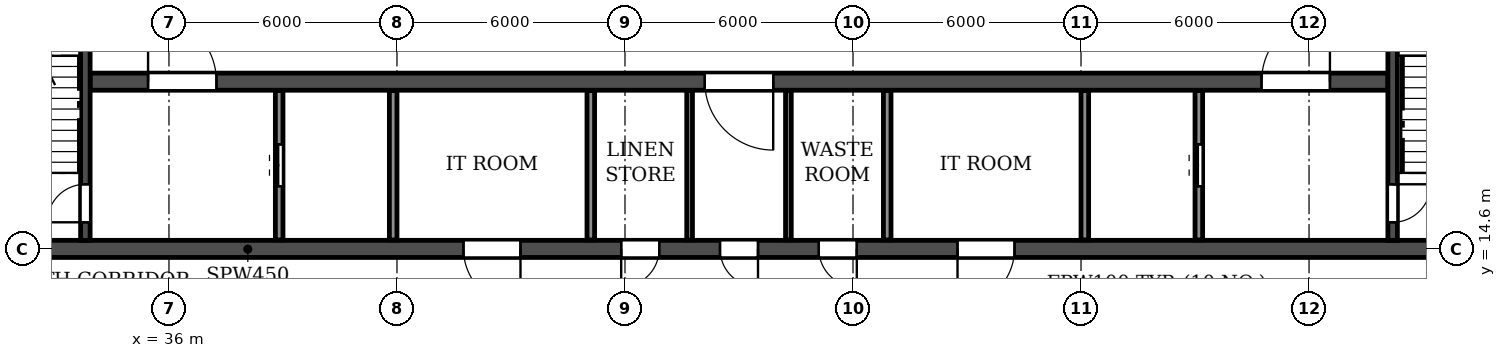
"""IFC4 building model, lengths in metres.
Left out: names, types, materials, properties, quantities, classifications, styles, units other than length and angle.
Written with IfcOpenShell. Run it as: python <this file> out.ifc"""

import sys

from ifc_helpers import new_model, si_unit, direction, frame, frame_2d, origin, place, context, subcontext, project, spatial, rectangle, extrude, element, fill, save


model = new_model("IFC4")
c1 = context("Model", 3, precision=1e-05, world=origin(), true_north=direction((0.0, 1.0)))
c2 = subcontext(c1, "Body", "Model", "MODEL_VIEW")
j1 = project(units=[si_unit("LENGTHUNIT", "METRE"), si_unit("PLANEANGLEUNIT", "RADIAN")], contexts=[c1])
p1 = place(None, origin())
s1 = spatial("IfcSite", under=j1, at=p1, CompositionType="ELEMENT")
p2 = place(p1, origin())
s2 = spatial("IfcBuilding", under=s1, at=p2, CompositionType="ELEMENT")
p3 = place(p2, frame((0.0, 0.0, 132.3)))
s3 = spatial("IfcBuildingStorey", under=s2, at=p3, CompositionType="ELEMENT", Elevation=132.3)
p4 = place(p3, frame((12.2, 14.6, 0.0), z_axis=(0.0, 0.0, 1.0), x_axis=(1.0, 0.0, 0.0)))
e1 = element("IfcWall", 1, at=p4, inside=s3, PredefinedType="SOLIDWALL", context=c2, shape_type="SweptSolid", body=[
    extrude(rectangle(XDim=77.6, YDim=0.45, at=frame_2d((38.8, 0.0))), origin(), (0.0, 0.0, 1.0), 3.07),
])
p5 = place(p4, frame((2.3, 0.0, 0.0)))
e2 = element("IfcOpeningElement", 2, at=p5, cuts=e1, PredefinedType="OPENING", context=c2, shape_type="SweptSolid", body=[
    extrude(rectangle(XDim=1.0, YDim=2.1, at=frame_2d((0.5, 1.05))), frame((0.0, 0.235, 0.0), z_axis=(0.0, -1.0, 0.0), x_axis=(1.0, 0.0, 0.0)), (0.0, 0.0, 1.0), 0.47),
])
p6 = place(p4, frame((6.7, 0.0, 0.0)))
e3 = element("IfcOpeningElement", 3, at=p6, cuts=e1, PredefinedType="OPENING", context=c2, shape_type="SweptSolid", body=[
    extrude(rectangle(XDim=1.0, YDim=2.1, at=frame_2d((0.5, 1.05))), frame((0.0, 0.235, 0.0), z_axis=(0.0, -1.0, 0.0), x_axis=(1.0, 0.0, 0.0)), (0.0, 0.0, 1.0), 0.47),
])
p7 = place(p4, frame((14.6, 0.0, 0.0)))
e4 = element("IfcOpeningElement", 4, at=p7, cuts=e1, PredefinedType="OPENING", context=c2, shape_type="SweptSolid", body=[
    extrude(rectangle(XDim=1.0, YDim=2.1, at=frame_2d((0.5, 1.05))), frame((0.0, 0.235, 0.0), z_axis=(0.0, -1.0, 0.0), x_axis=(1.0, 0.0, 0.0)), (0.0, 0.0, 1.0), 0.47),
])
p8 = place(p4, frame((19.2, 0.0, 0.0)))
e5 = element("IfcOpeningElement", 5, at=p8, cuts=e1, PredefinedType="OPENING", context=c2, shape_type="SweptSolid", body=[
    extrude(rectangle(XDim=1.0, YDim=2.1, at=frame_2d((0.5, 1.05))), frame((0.0, 0.235, 0.0), z_axis=(0.0, -1.0, 0.0), x_axis=(1.0, 0.0, 0.0)), (0.0, 0.0, 1.0), 0.47),
])
p9 = place(p4, frame((31.55, 0.0, 0.0)))
e6 = element("IfcOpeningElement", 6, at=p9, cuts=e1, PredefinedType="OPENING", context=c2, shape_type="SweptSolid", body=[
    extrude(rectangle(XDim=1.5, YDim=2.1, at=frame_2d((0.75, 1.05))), frame((0.0, 0.235, 0.0), z_axis=(0.0, -1.0, 0.0), x_axis=(1.0, 0.0, 0.0)), (0.0, 0.0, 1.0), 0.47),
])
p10 = place(p4, frame((35.7, 0.0, 0.0)))
e7 = element("IfcOpeningElement", 7, at=p10, cuts=e1, PredefinedType="OPENING", context=c2, shape_type="SweptSolid", body=[
    extrude(rectangle(XDim=1.0, YDim=2.1, at=frame_2d((0.5, 1.05))), frame((0.0, 0.235, 0.0), z_axis=(0.0, -1.0, 0.0), x_axis=(1.0, 0.0, 0.0)), (0.0, 0.0, 1.0), 0.47),
])
p11 = place(p4, frame((38.3, 0.0, 0.0)))
e8 = element("IfcOpeningElement", 8, at=p11, cuts=e1, PredefinedType="OPENING", context=c2, shape_type="SweptSolid", body=[
    extrude(rectangle(XDim=1.0, YDim=2.1, at=frame_2d((0.5, 1.05))), frame((0.0, 0.235, 0.0), z_axis=(0.0, -1.0, 0.0), x_axis=(1.0, 0.0, 0.0)), (0.0, 0.0, 1.0), 0.47),
])
p12 = place(p4, frame((40.9, 0.0, 0.0)))
e9 = element("IfcOpeningElement", 9, at=p12, cuts=e1, PredefinedType="OPENING", context=c2, shape_type="SweptSolid", body=[
    extrude(rectangle(XDim=1.0, YDim=2.1, at=frame_2d((0.5, 1.05))), frame((0.0, 0.235, 0.0), z_axis=(0.0, -1.0, 0.0), x_axis=(1.0, 0.0, 0.0)), (0.0, 0.0, 1.0), 0.47),
])
p13 = place(p4, frame((44.55, 0.0, 0.0)))
e10 = element("IfcOpeningElement", 10, at=p13, cuts=e1, PredefinedType="OPENING", context=c2, shape_type="SweptSolid", body=[
    extrude(rectangle(XDim=1.5, YDim=2.1, at=frame_2d((0.75, 1.05))), frame((0.0, 0.235, 0.0), z_axis=(0.0, -1.0, 0.0), x_axis=(1.0, 0.0, 0.0)), (0.0, 0.0, 1.0), 0.47),
])
p14 = place(p4, frame((57.4, 0.0, 0.0)))
e11 = element("IfcOpeningElement", 11, at=p14, cuts=e1, PredefinedType="OPENING", context=c2, shape_type="SweptSolid", body=[
    extrude(rectangle(XDim=1.0, YDim=2.1, at=frame_2d((0.5, 1.05))), frame((0.0, 0.235, 0.0), z_axis=(0.0, -1.0, 0.0), x_axis=(1.0, 0.0, 0.0)), (0.0, 0.0, 1.0), 0.47),
])
p15 = place(p4, frame((62.0, 0.0, 0.0)))
e12 = element("IfcOpeningElement", 12, at=p15, cuts=e1, PredefinedType="OPENING", context=c2, shape_type="SweptSolid", body=[
    extrude(rectangle(XDim=1.0, YDim=2.1, at=frame_2d((0.5, 1.05))), frame((0.0, 0.235, 0.0), z_axis=(0.0, -1.0, 0.0), x_axis=(1.0, 0.0, 0.0)), (0.0, 0.0, 1.0), 0.47),
])
p16 = place(p4, frame((69.9, 0.0, 0.0)))
e13 = element("IfcOpeningElement", 13, at=p16, cuts=e1, PredefinedType="OPENING", context=c2, shape_type="SweptSolid", body=[
    extrude(rectangle(XDim=1.0, YDim=2.1, at=frame_2d((0.5, 1.05))), frame((0.0, 0.235, 0.0), z_axis=(0.0, -1.0, 0.0), x_axis=(1.0, 0.0, 0.0)), (0.0, 0.0, 1.0), 0.47),
])
p17 = place(p4, frame((74.3, 0.0, 0.0)))
e14 = element("IfcOpeningElement", 14, at=p17, cuts=e1, PredefinedType="OPENING", context=c2, shape_type="SweptSolid", body=[
    extrude(rectangle(XDim=1.0, YDim=2.1, at=frame_2d((0.5, 1.05))), frame((0.0, 0.235, 0.0), z_axis=(0.0, -1.0, 0.0), x_axis=(1.0, 0.0, 0.0)), (0.0, 0.0, 1.0), 0.47),
])
p18 = place(p3, frame((33.925, 19.0, 0.0), z_axis=(0.0, 0.0, 1.0), x_axis=(1.0, 0.0, 0.0)))
e15 = element("IfcWall", 15, at=p18, inside=s3, PredefinedType="SOLIDWALL", context=c2, shape_type="SweptSolid", body=[
    extrude(rectangle(XDim=34.15, YDim=0.45, at=frame_2d((17.075, 0.0))), origin(), (0.0, 0.0, 1.0), 3.07),
])
p19 = place(p18, frame((16.175, 0.0, 0.0)))
e16 = element("IfcOpeningElement", 16, at=p19, cuts=e15, PredefinedType="OPENING", context=c2, shape_type="SweptSolid", body=[
    extrude(rectangle(XDim=1.8, YDim=2.1, at=frame_2d((0.9, 1.05))), frame((0.0, 0.235, 0.0), z_axis=(0.0, -1.0, 0.0), x_axis=(1.0, 0.0, 0.0)), (0.0, 0.0, 1.0), 0.47),
])
p20 = place(p18, frame((1.525, 0.0, 0.0)))
e17 = element("IfcOpeningElement", 17, at=p20, cuts=e15, PredefinedType="OPENING", context=c2, shape_type="SweptSolid", body=[
    extrude(rectangle(XDim=1.8, YDim=2.1, at=frame_2d((0.9, 1.05))), frame((0.0, 0.235, 0.0), z_axis=(0.0, -1.0, 0.0), x_axis=(1.0, 0.0, 0.0)), (0.0, 0.0, 1.0), 0.47),
])
p21 = place(p18, frame((30.825, 0.0, 0.0)))
e18 = element("IfcOpeningElement", 18, at=p21, cuts=e15, PredefinedType="OPENING", context=c2, shape_type="SweptSolid", body=[
    extrude(rectangle(XDim=1.8, YDim=2.1, at=frame_2d((0.9, 1.05))), frame((0.0, 0.235, 0.0), z_axis=(0.0, -1.0, 0.0), x_axis=(1.0, 0.0, 0.0)), (0.0, 0.0, 1.0), 0.47),
])
p22 = place(p3, frame((33.8, 14.825, 0.0), z_axis=(0.0, 0.0, 1.0), x_axis=(0.0, 1.0, 0.0)))
e19 = element("IfcWall", 19, at=p22, inside=s3, PredefinedType="SOLIDWALL", context=c2, shape_type="SweptSolid", body=[
    extrude(rectangle(XDim=7.65, YDim=0.25, at=frame_2d((3.825, 0.0))), origin(), (0.0, 0.0, 1.0), 3.07),
])
p23 = place(p22, frame((0.475, 0.0, 0.0)))
e20 = element("IfcOpeningElement", 20, at=p23, cuts=e19, PredefinedType="OPENING", context=c2, shape_type="SweptSolid", body=[
    extrude(rectangle(XDim=1.0, YDim=2.1, at=frame_2d((0.5, 1.05))), frame((0.0, 0.135, 0.0), z_axis=(0.0, -1.0, 0.0), x_axis=(1.0, 0.0, 0.0)), (0.0, 0.0, 1.0), 0.27),
])
p24 = place(p3, frame((68.2, 14.825, 0.0), z_axis=(0.0, 0.0, 1.0), x_axis=(0.0, 1.0, 0.0)))
e21 = element("IfcWall", 21, at=p24, inside=s3, PredefinedType="SOLIDWALL", context=c2, shape_type="SweptSolid", body=[
    extrude(rectangle(XDim=7.65, YDim=0.25, at=frame_2d((3.825, 0.0))), origin(), (0.0, 0.0, 1.0), 3.07),
])
p25 = place(p24, frame((0.475, 0.0, 0.0)))
e22 = element("IfcOpeningElement", 22, at=p25, cuts=e21, PredefinedType="OPENING", context=c2, shape_type="SweptSolid", body=[
    extrude(rectangle(XDim=1.0, YDim=2.1, at=frame_2d((0.5, 1.05))), frame((0.0, 0.135, 0.0), z_axis=(0.0, -1.0, 0.0), x_axis=(1.0, 0.0, 0.0)), (0.0, 0.0, 1.0), 0.27),
])
for number, where, z_axis, x_axis in (
    (23, (49.7, 14.835, 0.0), (0.0, 0.0, 1.0), (0.0, 1.0, 0.0)),
    (24, (52.3, 14.835, 0.0), (0.0, 0.0, 1.0), (0.0, 1.0, 0.0)),
):
    element("IfcWall", number, at=place(p3, frame(where, z_axis=z_axis, x_axis=x_axis)), inside=s3, PredefinedType="PARTITIONING", context=c2, shape_type="SweptSolid", body=[
        extrude(rectangle(XDim=3.93, YDim=0.15, at=frame_2d((1.965, 0.0))), origin(), (0.0, 0.0, 1.0), 3.07),
    ])
for number, where, z_axis, x_axis in (
    (25, (47.1, 14.835, 0.0), (0.0, 0.0, 1.0), (0.0, 1.0, 0.0)),
    (26, (54.9, 14.835, 0.0), (0.0, 0.0, 1.0), (0.0, 1.0, 0.0)),
):
    element("IfcWall", number, at=place(p3, frame(where, z_axis=z_axis, x_axis=x_axis)), inside=s3, PredefinedType="PARTITIONING", context=c2, shape_type="SweptSolid", body=[
        extrude(rectangle(XDim=3.93, YDim=0.2, at=frame_2d((1.965, 0.0))), origin(), (0.0, 0.0, 1.0), 3.07),
    ])
p26 = place(p3, frame((38.9, 14.835, 0.0), z_axis=(0.0, 0.0, 1.0), x_axis=(0.0, 1.0, 0.0)))
e27 = element("IfcWall", 27, at=p26, inside=s3, PredefinedType="PARTITIONING", context=c2, shape_type="SweptSolid", body=[
    extrude(rectangle(XDim=3.93, YDim=0.2, at=frame_2d((1.965, 0.0))), origin(), (0.0, 0.0, 1.0), 3.07),
])
p27 = place(p26, frame((1.415, 0.0, 0.0)))
e28 = element("IfcOpeningElement", 28, at=p27, cuts=e27, PredefinedType="OPENING", context=c2, shape_type="SweptSolid", body=[
    extrude(rectangle(XDim=1.1, YDim=2.1, at=frame_2d((0.55, 1.05))), frame((0.0, 0.11, 0.0), z_axis=(0.0, -1.0, 0.0), x_axis=(1.0, 0.0, 0.0)), (0.0, 0.0, 1.0), 0.22),
])
for number, where, z_axis, x_axis in (
    (29, (41.9, 14.835, 0.0), (0.0, 0.0, 1.0), (0.0, 1.0, 0.0)),
    (30, (60.1, 14.835, 0.0), (0.0, 0.0, 1.0), (0.0, 1.0, 0.0)),
):
    element("IfcWall", number, at=place(p3, frame(where, z_axis=z_axis, x_axis=x_axis)), inside=s3, PredefinedType="PARTITIONING", context=c2, shape_type="SweptSolid", body=[
        extrude(rectangle(XDim=3.93, YDim=0.2, at=frame_2d((1.965, 0.0))), origin(), (0.0, 0.0, 1.0), 3.07),
    ])
p28 = place(p3, frame((63.1, 14.835, 0.0), z_axis=(0.0, 0.0, 1.0), x_axis=(0.0, 1.0, 0.0)))
e31 = element("IfcWall", 31, at=p28, inside=s3, PredefinedType="PARTITIONING", context=c2, shape_type="SweptSolid", body=[
    extrude(rectangle(XDim=3.93, YDim=0.2, at=frame_2d((1.965, 0.0))), origin(), (0.0, 0.0, 1.0), 3.07),
])
p29 = place(p28, frame((1.415, 0.0, 0.0)))
e32 = element("IfcOpeningElement", 32, at=p29, cuts=e31, PredefinedType="OPENING", context=c2, shape_type="SweptSolid", body=[
    extrude(rectangle(XDim=1.1, YDim=2.1, at=frame_2d((0.55, 1.05))), frame((0.0, 0.11, 0.0), z_axis=(0.0, -1.0, 0.0), x_axis=(1.0, 0.0, 0.0)), (0.0, 0.0, 1.0), 0.22),
])
p30 = place(p9, frame((1.5, 0.0, 0.0), z_axis=(0.0, 0.0, 1.0), x_axis=(-1.0, 0.0, 0.0)))
e33 = element("IfcDoor", 33, at=p30, inside=s3, OperationType="DOUBLE_DOOR_SINGLE_SWING", PredefinedType="DOOR", context=c2, shape_type="SweptSolid", body=[
    extrude(rectangle(XDim=1.5, YDim=2.1, at=frame_2d((0.75, 1.05))), frame((0.0, 0.025, 0.0), z_axis=(0.0, -1.0, 0.0), x_axis=(1.0, 0.0, 0.0)), (0.0, 0.0, 1.0), 0.05),
])
fill(e6, e33)
p31 = place(p10, frame((1.0, 0.0, 0.0), z_axis=(0.0, 0.0, 1.0), x_axis=(-1.0, 0.0, 0.0)))
e34 = element("IfcDoor", 34, at=p31, inside=s3, OperationType="SINGLE_SWING_RIGHT", PredefinedType="DOOR", context=c2, shape_type="SweptSolid", body=[
    extrude(rectangle(XDim=1.0, YDim=2.1, at=frame_2d((0.5, 1.05))), frame((0.0, 0.025, 0.0), z_axis=(0.0, -1.0, 0.0), x_axis=(1.0, 0.0, 0.0)), (0.0, 0.0, 1.0), 0.05),
])
fill(e7, e34)
p32 = place(p11, frame((1.0, 0.0, 0.0), z_axis=(0.0, 0.0, 1.0), x_axis=(-1.0, 0.0, 0.0)))
e35 = element("IfcDoor", 35, at=p32, inside=s3, OperationType="SINGLE_SWING_LEFT", PredefinedType="DOOR", context=c2, shape_type="SweptSolid", body=[
    extrude(rectangle(XDim=1.0, YDim=2.1, at=frame_2d((0.5, 1.05))), frame((0.0, 0.025, 0.0), z_axis=(0.0, -1.0, 0.0), x_axis=(1.0, 0.0, 0.0)), (0.0, 0.0, 1.0), 0.05),
])
fill(e8, e35)
p33 = place(p12, frame((1.0, 0.0, 0.0), z_axis=(0.0, 0.0, 1.0), x_axis=(-1.0, 0.0, 0.0)))
e36 = element("IfcDoor", 36, at=p33, inside=s3, OperationType="SINGLE_SWING_LEFT", PredefinedType="DOOR", context=c2, shape_type="SweptSolid", body=[
    extrude(rectangle(XDim=1.0, YDim=2.1, at=frame_2d((0.5, 1.05))), frame((0.0, 0.025, 0.0), z_axis=(0.0, -1.0, 0.0), x_axis=(1.0, 0.0, 0.0)), (0.0, 0.0, 1.0), 0.05),
])
fill(e9, e36)
p34 = place(p13, frame((1.5, 0.0, 0.0), z_axis=(0.0, 0.0, 1.0), x_axis=(-1.0, 0.0, 0.0)))
e37 = element("IfcDoor", 37, at=p34, inside=s3, OperationType="DOUBLE_DOOR_SINGLE_SWING", PredefinedType="DOOR", context=c2, shape_type="SweptSolid", body=[
    extrude(rectangle(XDim=1.5, YDim=2.1, at=frame_2d((0.75, 1.05))), frame((0.0, 0.025, 0.0), z_axis=(0.0, -1.0, 0.0), x_axis=(1.0, 0.0, 0.0)), (0.0, 0.0, 1.0), 0.05),
])
fill(e10, e37)
p35 = place(p29, origin())
e38 = element("IfcDoor", 38, at=p35, inside=s3, OperationType="DOUBLE_DOOR_SLIDING", PredefinedType="DOOR", context=c2, shape_type="SweptSolid", body=[
    extrude(rectangle(XDim=1.1, YDim=2.1, at=frame_2d((0.55, 1.05))), frame((0.0, 0.025, 0.0), z_axis=(0.0, -1.0, 0.0), x_axis=(1.0, 0.0, 0.0)), (0.0, 0.0, 1.0), 0.05),
])
fill(e32, e38)
p36 = place(p25, frame((1.0, 0.0, 0.0), z_axis=(0.0, 0.0, 1.0), x_axis=(-1.0, 0.0, 0.0)))
e39 = element("IfcDoor", 39, at=p36, inside=s3, OperationType="SINGLE_SWING_LEFT", PredefinedType="DOOR", context=c2, shape_type="SweptSolid", body=[
    extrude(rectangle(XDim=1.0, YDim=2.1, at=frame_2d((0.5, 1.05))), frame((0.0, 0.025, 0.0), z_axis=(0.0, -1.0, 0.0), x_axis=(1.0, 0.0, 0.0)), (0.0, 0.0, 1.0), 0.05),
])
fill(e22, e39)
p37 = place(p23, origin())
e40 = element("IfcDoor", 40, at=p37, inside=s3, OperationType="SINGLE_SWING_LEFT", PredefinedType="DOOR", context=c2, shape_type="SweptSolid", body=[
    extrude(rectangle(XDim=1.0, YDim=2.1, at=frame_2d((0.5, 1.05))), frame((0.0, 0.025, 0.0), z_axis=(0.0, -1.0, 0.0), x_axis=(1.0, 0.0, 0.0)), (0.0, 0.0, 1.0), 0.05),
])
fill(e20, e40)
p38 = place(p27, origin())
e41 = element("IfcDoor", 41, at=p38, inside=s3, OperationType="DOUBLE_DOOR_SLIDING", PredefinedType="DOOR", context=c2, shape_type="SweptSolid", body=[
    extrude(rectangle(XDim=1.1, YDim=2.1, at=frame_2d((0.55, 1.05))), frame((0.0, 0.025, 0.0), z_axis=(0.0, -1.0, 0.0), x_axis=(1.0, 0.0, 0.0)), (0.0, 0.0, 1.0), 0.05),
])
fill(e28, e41)
p39 = place(p19, frame((1.8, 0.0, 0.0), z_axis=(0.0, 0.0, 1.0), x_axis=(-1.0, 0.0, 0.0)))
e42 = element("IfcDoor", 42, at=p39, inside=s3, OperationType="DOUBLE_DOOR_SINGLE_SWING", PredefinedType="DOOR", context=c2, shape_type="SweptSolid", body=[
    extrude(rectangle(XDim=1.8, YDim=2.1, at=frame_2d((0.9, 1.05))), frame((0.0, 0.025, 0.0), z_axis=(0.0, -1.0, 0.0), x_axis=(1.0, 0.0, 0.0)), (0.0, 0.0, 1.0), 0.05),
])
fill(e16, e42)
p40 = place(p20, origin())
e43 = element("IfcDoor", 43, at=p40, inside=s3, OperationType="DOUBLE_DOOR_SINGLE_SWING", PredefinedType="DOOR", context=c2, shape_type="SweptSolid", body=[
    extrude(rectangle(XDim=1.8, YDim=2.1, at=frame_2d((0.9, 1.05))), frame((0.0, 0.025, 0.0), z_axis=(0.0, -1.0, 0.0), x_axis=(1.0, 0.0, 0.0)), (0.0, 0.0, 1.0), 0.05),
])
fill(e17, e43)
p41 = place(p21, origin())
e44 = element("IfcDoor", 44, at=p41, inside=s3, OperationType="DOUBLE_DOOR_SINGLE_SWING", PredefinedType="DOOR", context=c2, shape_type="SweptSolid", body=[
    extrude(rectangle(XDim=1.8, YDim=2.1, at=frame_2d((0.9, 1.05))), frame((0.0, 0.025, 0.0), z_axis=(0.0, -1.0, 0.0), x_axis=(1.0, 0.0, 0.0)), (0.0, 0.0, 1.0), 0.05),
])
fill(e18, e44)
save(model, sys.argv[1])
